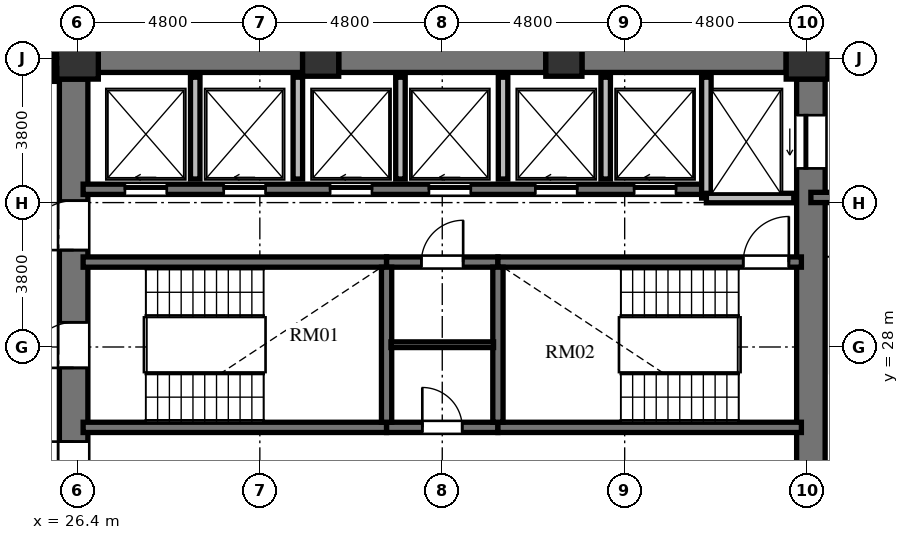
"""IFC4 building model, lengths in metres.
Left out: names, types, materials, properties, quantities, classifications, styles, units other than length and angle.
Written with IfcOpenShell. Run it as: python <this file> out.ifc"""

import sys

from ifc_helpers import new_model, si_unit, direction, frame, frame_2d, origin, origin_2d, place, context, subcontext, project, spatial, rectangle, extrude, element, fill, save


model = new_model("IFC4")
c1 = context("Model", 3, precision=1e-05, world=origin(), true_north=direction((0.0, 1.0)))
c2 = subcontext(c1, "Body", "Model", "MODEL_VIEW")
j1 = project(units=[si_unit("LENGTHUNIT", "METRE"), si_unit("PLANEANGLEUNIT", "RADIAN")], contexts=[c1])
p1 = place(None, origin())
s1 = spatial("IfcSite", under=j1, at=p1, CompositionType="ELEMENT")
p2 = place(p1, origin())
s2 = spatial("IfcBuilding", under=s1, at=p2, CompositionType="ELEMENT")
p3 = place(p2, frame((0.0, 0.0, 107.28)))
s3 = spatial("IfcBuildingStorey", under=s2, at=p3, CompositionType="ELEMENT", Elevation=107.28)
p4 = place(p3, frame((45.6, 35.6, 0.0), z_axis=(0.0, 0.0, 1.0), x_axis=(1.0, 0.0, 0.0)))
e1 = element("IfcColumn", 1, at=p4, inside=s3, PredefinedType="COLUMN", context=c2, shape_type="SweptSolid", body=[
    extrude(rectangle(XDim=1.1, YDim=1.1, at=origin_2d()), origin(), (0.0, 0.0, 1.0), 3.648),
])
for number, where, z_axis, x_axis in (
    (2, (39.2, 35.6, 0.0), (0.0, 0.0, 1.0), (1.0, 0.0, 0.0)),
    (3, (32.8, 35.6, 0.0), (0.0, 0.0, 1.0), (1.0, 0.0, 0.0)),
):
    element("IfcColumn", number, at=place(p3, frame(where, z_axis=z_axis, x_axis=x_axis)), inside=s3, PredefinedType="COLUMN", context=c2, shape_type="SweptSolid", body=[
        extrude(rectangle(XDim=0.95, YDim=0.95, at=origin_2d()), origin(), (0.0, 0.0, 1.0), 3.648),
    ])
p5 = place(p3, frame((26.4, 35.6, 0.0), z_axis=(0.0, 0.0, 1.0), x_axis=(1.0, 0.0, 0.0)))
e4 = element("IfcColumn", 4, at=p5, inside=s3, PredefinedType="COLUMN", context=c2, shape_type="SweptSolid", body=[
    extrude(rectangle(XDim=1.1, YDim=1.1, at=origin_2d()), origin(), (0.0, 0.0, 1.0), 3.648),
])
p6 = place(p3, frame((26.3, 20.95, 0.0), z_axis=(0.0, 0.0, 1.0), x_axis=(0.0, 1.0, 0.0)))
e5 = element("IfcWall", 5, at=p6, inside=s3, PredefinedType="SHEAR", context=c2, shape_type="SweptSolid", body=[
    extrude(rectangle(XDim=14.1, YDim=0.75, at=frame_2d((7.05, 0.0))), origin(), (0.0, 0.0, 1.0), 3.648),
])
p7 = place(p6, frame((6.5, 0.0, 0.0)))
e6 = element("IfcOpeningElement", 6, at=p7, cuts=e5, PredefinedType="OPENING", context=c2, shape_type="SweptSolid", body=[
    extrude(rectangle(XDim=1.2, YDim=2.15, at=frame_2d((0.6, 1.075))), frame((0.0, 0.385, 0.0), z_axis=(0.0, -1.0, 0.0), x_axis=(1.0, 0.0, 0.0)), (0.0, 0.0, 1.0), 0.77),
])
p8 = place(p6, frame((9.6, 0.0, 0.0)))
e7 = element("IfcOpeningElement", 7, at=p8, cuts=e5, PredefinedType="OPENING", context=c2, shape_type="SweptSolid", body=[
    extrude(rectangle(XDim=1.3, YDim=2.2, at=frame_2d((0.65, 1.1))), frame((0.0, 0.385, 0.0), z_axis=(0.0, -1.0, 0.0), x_axis=(1.0, 0.0, 0.0)), (0.0, 0.0, 1.0), 0.77),
])
p9 = place(p6, frame((3.26, 0.0, 0.0)))
e8 = element("IfcOpeningElement", 8, at=p9, cuts=e5, PredefinedType="OPENING", context=c2, shape_type="SweptSolid", body=[
    extrude(rectangle(XDim=1.3, YDim=2.2, at=frame_2d((0.65, 1.1))), frame((0.0, 0.385, 0.0), z_axis=(0.0, -1.0, 0.0), x_axis=(1.0, 0.0, 0.0)), (0.0, 0.0, 1.0), 0.77),
])
p10 = place(p3, frame((45.7, 20.95, 0.0), z_axis=(0.0, 0.0, 1.0), x_axis=(0.0, 1.0, 0.0)))
e9 = element("IfcWall", 9, at=p10, inside=s3, PredefinedType="SHEAR", context=c2, shape_type="SweptSolid", body=[
    extrude(rectangle(XDim=14.1, YDim=0.75, at=frame_2d((7.05, 0.0))), origin(), (0.0, 0.0, 1.0), 3.648),
])
p11 = place(p10, frame((11.75, 0.0, 0.0)))
e10 = element("IfcOpeningElement", 10, at=p11, cuts=e9, PredefinedType="OPENING", context=c2, shape_type="SweptSolid", body=[
    extrude(rectangle(XDim=1.4, YDim=2.3, at=frame_2d((0.7, 1.15))), frame((0.0, 0.385, 0.0), z_axis=(0.0, -1.0, 0.0), x_axis=(1.0, 0.0, 0.0)), (0.0, 0.0, 1.0), 0.77),
])
p12 = place(p10, frame((0.95, 0.0, 0.0)))
e11 = element("IfcOpeningElement", 11, at=p12, cuts=e9, PredefinedType="OPENING", context=c2, shape_type="SweptSolid", body=[
    extrude(rectangle(XDim=1.4, YDim=2.3, at=frame_2d((0.7, 1.15))), frame((0.0, 0.385, 0.0), z_axis=(0.0, -1.0, 0.0), x_axis=(1.0, 0.0, 0.0)), (0.0, 0.0, 1.0), 0.77),
])
p13 = place(p3, frame((26.95, 35.6, 0.0), z_axis=(0.0, 0.0, 1.0), x_axis=(1.0, 0.0, 0.0)))
e12 = element("IfcWall", 12, at=p13, inside=s3, PredefinedType="SHEAR", context=c2, shape_type="SweptSolid", body=[
    extrude(rectangle(XDim=5.375, YDim=0.75, at=frame_2d((2.688, 0.0))), origin(), (0.0, 0.0, 1.0), 3.648),
])
p14 = place(p3, frame((33.275, 35.6, 0.0), z_axis=(0.0, 0.0, 1.0), x_axis=(1.0, 0.0, 0.0)))
e13 = element("IfcWall", 13, at=p14, inside=s3, PredefinedType="SHEAR", context=c2, shape_type="SweptSolid", body=[
    extrude(rectangle(XDim=5.45, YDim=0.75, at=frame_2d((2.725, 0.0))), origin(), (0.0, 0.0, 1.0), 3.648),
])
p15 = place(p3, frame((39.675, 35.6, 0.0), z_axis=(0.0, 0.0, 1.0), x_axis=(1.0, 0.0, 0.0)))
e14 = element("IfcWall", 14, at=p15, inside=s3, PredefinedType="SHEAR", context=c2, shape_type="SweptSolid", body=[
    extrude(rectangle(XDim=5.375, YDim=0.75, at=frame_2d((2.688, 0.0))), origin(), (0.0, 0.0, 1.0), 3.648),
])
p16 = place(p3, frame((26.55, 30.235, 0.0), z_axis=(0.0, 0.0, 1.0), x_axis=(1.0, 0.0, 0.0)))
e15 = element("IfcWall", 15, at=p16, inside=s3, PredefinedType="SHEAR", context=c2, shape_type="SweptSolid", body=[
    extrude(rectangle(XDim=7.985, YDim=0.27, at=frame_2d((3.992, 0.0))), origin(), (0.0, 0.0, 1.0), 3.648),
])
p17 = place(p3, frame((34.535, 30.235, 0.0), z_axis=(0.0, 0.0, 1.0), x_axis=(1.0, 0.0, 0.0)))
e16 = element("IfcWall", 16, at=p17, inside=s3, PredefinedType="SHEAR", context=c2, shape_type="SweptSolid", body=[
    extrude(rectangle(XDim=2.93, YDim=0.27, at=frame_2d((1.465, 0.0))), origin(), (0.0, 0.0, 1.0), 3.648),
])
p18 = place(p17, frame((0.915, 0.0, 0.0)))
e17 = element("IfcOpeningElement", 17, at=p18, cuts=e16, PredefinedType="OPENING", context=c2, shape_type="SweptSolid", body=[
    extrude(rectangle(XDim=1.1, YDim=2.15, at=frame_2d((0.55, 1.075))), frame((0.0, 0.145, 0.0), z_axis=(0.0, -1.0, 0.0), x_axis=(1.0, 0.0, 0.0)), (0.0, 0.0, 1.0), 0.29),
])
p19 = place(p3, frame((37.465, 30.235, 0.0), z_axis=(0.0, 0.0, 1.0), x_axis=(1.0, 0.0, 0.0)))
e18 = element("IfcWall", 18, at=p19, inside=s3, PredefinedType="SHEAR", context=c2, shape_type="SweptSolid", body=[
    extrude(rectangle(XDim=7.985, YDim=0.27, at=frame_2d((3.992, 0.0))), origin(), (0.0, 0.0, 1.0), 3.648),
])
p20 = place(p19, frame((6.455, 0.0, 0.0)))
e19 = element("IfcOpeningElement", 19, at=p20, cuts=e18, PredefinedType="OPENING", context=c2, shape_type="SweptSolid", body=[
    extrude(rectangle(XDim=1.2, YDim=2.15, at=frame_2d((0.6, 1.075))), frame((0.0, 0.145, 0.0), z_axis=(0.0, -1.0, 0.0), x_axis=(1.0, 0.0, 0.0)), (0.0, 0.0, 1.0), 0.29),
])
p21 = place(p3, frame((26.55, 25.885, 0.0), z_axis=(0.0, 0.0, 1.0), x_axis=(1.0, 0.0, 0.0)))
e20 = element("IfcWall", 20, at=p21, inside=s3, PredefinedType="SHEAR", context=c2, shape_type="SweptSolid", body=[
    extrude(rectangle(XDim=7.985, YDim=0.27, at=frame_2d((3.992, 0.0))), origin(), (0.0, 0.0, 1.0), 3.648),
])
p22 = place(p3, frame((34.535, 25.885, 0.0), z_axis=(0.0, 0.0, 1.0), x_axis=(1.0, 0.0, 0.0)))
e21 = element("IfcWall", 21, at=p22, inside=s3, PredefinedType="SHEAR", context=c2, shape_type="SweptSolid", body=[
    extrude(rectangle(XDim=2.93, YDim=0.27, at=frame_2d((1.465, 0.0))), origin(), (0.0, 0.0, 1.0), 3.648),
])
p23 = place(p22, frame((0.94, 0.0, 0.0)))
e22 = element("IfcOpeningElement", 22, at=p23, cuts=e21, PredefinedType="OPENING", context=c2, shape_type="SweptSolid", body=[
    extrude(rectangle(XDim=1.05, YDim=2.15, at=frame_2d((0.525, 1.075))), frame((0.0, 0.145, 0.0), z_axis=(0.0, -1.0, 0.0), x_axis=(1.0, 0.0, 0.0)), (0.0, 0.0, 1.0), 0.29),
])
p24 = place(p3, frame((37.465, 25.885, 0.0), z_axis=(0.0, 0.0, 1.0), x_axis=(1.0, 0.0, 0.0)))
e23 = element("IfcWall", 23, at=p24, inside=s3, PredefinedType="SHEAR", context=c2, shape_type="SweptSolid", body=[
    extrude(rectangle(XDim=7.985, YDim=0.27, at=frame_2d((3.992, 0.0))), origin(), (0.0, 0.0, 1.0), 3.648),
])
for number, where, z_axis, x_axis in (
    (24, (34.535, 26.02, 0.0), (0.0, 0.0, 1.0), (0.0, 1.0, 0.0)),
    (25, (37.465, 26.02, 0.0), (0.0, 0.0, 1.0), (0.0, 1.0, 0.0)),
):
    element("IfcWall", number, at=place(p3, frame(where, z_axis=z_axis, x_axis=x_axis)), inside=s3, PredefinedType="SHEAR", context=c2, shape_type="SweptSolid", body=[
        extrude(rectangle(XDim=4.08, YDim=0.27, at=frame_2d((2.04, 0.0))), origin(), (0.0, 0.0, 1.0), 3.648),
    ])
p25 = place(p3, frame((34.65, 28.06, 0.0), z_axis=(0.0, 0.0, 1.0), x_axis=(1.0, 0.0, 0.0)))
e26 = element("IfcWall", 26, at=p25, inside=s3, PredefinedType="PARTITIONING", context=c2, shape_type="SweptSolid", body=[
    extrude(rectangle(XDim=2.7, YDim=0.15, at=frame_2d((1.35, 0.0))), origin(), (0.0, 0.0, 1.0), 3.428),
])
p26 = place(p3, frame((26.55, 32.15, 0.0), z_axis=(0.0, 0.0, 1.0), x_axis=(1.0, 0.0, 0.0)))
e27 = element("IfcWall", 27, at=p26, inside=s3, PredefinedType="SHEAR", context=c2, shape_type="SweptSolid", body=[
    extrude(rectangle(XDim=16.4, YDim=0.27, at=frame_2d((8.2, 0.0))), origin(), (0.0, 0.0, 1.0), 3.648),
])
p27 = place(p26, frame((1.1, 0.0, 0.0)))
e28 = element("IfcOpeningElement", 28, at=p27, cuts=e27, PredefinedType="OPENING", context=c2, shape_type="SweptSolid", body=[
    extrude(rectangle(XDim=1.1, YDim=2.2, at=frame_2d((0.55, 1.1))), frame((0.0, 0.145, 0.0), z_axis=(0.0, -1.0, 0.0), x_axis=(1.0, 0.0, 0.0)), (0.0, 0.0, 1.0), 0.29),
])
p28 = place(p26, frame((3.7, 0.0, 0.0)))
e29 = element("IfcOpeningElement", 29, at=p28, cuts=e27, PredefinedType="OPENING", context=c2, shape_type="SweptSolid", body=[
    extrude(rectangle(XDim=1.1, YDim=2.2, at=frame_2d((0.55, 1.1))), frame((0.0, 0.145, 0.0), z_axis=(0.0, -1.0, 0.0), x_axis=(1.0, 0.0, 0.0)), (0.0, 0.0, 1.0), 0.29),
])
p29 = place(p26, frame((6.5, 0.0, 0.0)))
e30 = element("IfcOpeningElement", 30, at=p29, cuts=e27, PredefinedType="OPENING", context=c2, shape_type="SweptSolid", body=[
    extrude(rectangle(XDim=1.1, YDim=2.2, at=frame_2d((0.55, 1.1))), frame((0.0, 0.145, 0.0), z_axis=(0.0, -1.0, 0.0), x_axis=(1.0, 0.0, 0.0)), (0.0, 0.0, 1.0), 0.29),
])
p30 = place(p26, frame((9.1, 0.0, 0.0)))
e31 = element("IfcOpeningElement", 31, at=p30, cuts=e27, PredefinedType="OPENING", context=c2, shape_type="SweptSolid", body=[
    extrude(rectangle(XDim=1.1, YDim=2.2, at=frame_2d((0.55, 1.1))), frame((0.0, 0.145, 0.0), z_axis=(0.0, -1.0, 0.0), x_axis=(1.0, 0.0, 0.0)), (0.0, 0.0, 1.0), 0.29),
])
p31 = place(p26, frame((11.9, 0.0, 0.0)))
e32 = element("IfcOpeningElement", 32, at=p31, cuts=e27, PredefinedType="OPENING", context=c2, shape_type="SweptSolid", body=[
    extrude(rectangle(XDim=1.1, YDim=2.2, at=frame_2d((0.55, 1.1))), frame((0.0, 0.145, 0.0), z_axis=(0.0, -1.0, 0.0), x_axis=(1.0, 0.0, 0.0)), (0.0, 0.0, 1.0), 0.29),
])
p32 = place(p26, frame((14.5, 0.0, 0.0)))
e33 = element("IfcOpeningElement", 33, at=p32, cuts=e27, PredefinedType="OPENING", context=c2, shape_type="SweptSolid", body=[
    extrude(rectangle(XDim=1.1, YDim=2.2, at=frame_2d((0.55, 1.1))), frame((0.0, 0.145, 0.0), z_axis=(0.0, -1.0, 0.0), x_axis=(1.0, 0.0, 0.0)), (0.0, 0.0, 1.0), 0.29),
])
p33 = place(p3, frame((42.95, 31.92, 0.0), z_axis=(0.0, 0.0, 1.0), x_axis=(0.0, 1.0, 0.0)))
e34 = element("IfcWall", 34, at=p33, inside=s3, PredefinedType="SOLIDWALL", context=c2, shape_type="SweptSolid", body=[
    extrude(rectangle(XDim=3.18, YDim=0.25, at=frame_2d((1.59, 0.0))), origin(), (0.0, 0.0, 1.0), 3.428),
])
p34 = place(p3, frame((42.95, 31.92, 0.0), z_axis=(0.0, 0.0, 1.0), x_axis=(1.0, 0.0, 0.0)))
e35 = element("IfcWall", 35, at=p34, inside=s3, PredefinedType="SOLIDWALL", context=c2, shape_type="SweptSolid", body=[
    extrude(rectangle(XDim=2.3, YDim=0.25, at=frame_2d((1.15, 0.0))), origin(), (0.0, 0.0, 1.0), 3.428),
])
for number, where, z_axis, x_axis in (
    (36, (29.5, 32.42, 0.0), (0.0, 0.0, 1.0), (0.0, 1.0, 0.0)),
    (37, (32.2, 32.42, 0.0), (0.0, 0.0, 1.0), (0.0, 1.0, 0.0)),
    (38, (34.9, 32.42, 0.0), (0.0, 0.0, 1.0), (0.0, 1.0, 0.0)),
    (39, (37.6, 32.42, 0.0), (0.0, 0.0, 1.0), (0.0, 1.0, 0.0)),
    (40, (40.3, 32.42, 0.0), (0.0, 0.0, 1.0), (0.0, 1.0, 0.0)),
):
    element("IfcWall", number, at=place(p3, frame(where, z_axis=z_axis, x_axis=x_axis)), inside=s3, PredefinedType="SOLIDWALL", context=c2, shape_type="SweptSolid", body=[
        extrude(rectangle(XDim=2.68, YDim=0.25, at=frame_2d((1.34, 0.0))), origin(), (0.0, 0.0, 1.0), 3.428),
    ])
p35 = place(p3, frame((45.7, 31.935, 0.0), z_axis=(0.0, 0.0, 1.0), x_axis=(1.0, 0.0, 0.0)))
e41 = element("IfcWall", 41, at=p35, inside=s3, PredefinedType="SHEAR", context=c2, shape_type="SweptSolid", body=[
    extrude(rectangle(XDim=4.715, YDim=0.27, at=frame_2d((2.357, 0.0))), origin(), (0.0, 0.0, 1.0), 3.648),
])
p36 = place(p3, frame((25.83, 36.21, 0.0), z_axis=(0.0, 0.0, 1.0), x_axis=(0.0, -1.0, 0.0)))
e42 = element("IfcWall", 42, at=p36, inside=s3, PredefinedType="PARTITIONING", context=c2, shape_type="SweptSolid", body=[
    extrude(rectangle(XDim=1.22, YDim=0.18, at=frame_2d((0.61, 0.0))), origin(), (0.0, 0.0, 1.0), 3.428),
])
p37 = place(p7, origin())
e43 = element("IfcDoor", 43, at=p37, inside=s3, OperationType="SINGLE_SWING_LEFT", PredefinedType="DOOR", context=c2, shape_type="SweptSolid", body=[
    extrude(rectangle(XDim=1.2, YDim=2.15, at=frame_2d((0.6, 1.075))), frame((0.0, 0.025, 0.0), z_axis=(0.0, -1.0, 0.0), x_axis=(1.0, 0.0, 0.0)), (0.0, 0.0, 1.0), 0.05),
])
fill(e6, e43)
p38 = place(p20, origin())
e44 = element("IfcDoor", 44, at=p38, inside=s3, OperationType="SINGLE_SWING_RIGHT", PredefinedType="DOOR", context=c2, shape_type="SweptSolid", body=[
    extrude(rectangle(XDim=1.2, YDim=2.15, at=frame_2d((0.6, 1.075))), frame((0.0, 0.025, 0.0), z_axis=(0.0, -1.0, 0.0), x_axis=(1.0, 0.0, 0.0)), (0.0, 0.0, 1.0), 0.05),
])
fill(e19, e44)
p39 = place(p23, origin())
e45 = element("IfcDoor", 45, at=p39, inside=s3, OperationType="SINGLE_SWING_LEFT", PredefinedType="DOOR", context=c2, shape_type="SweptSolid", body=[
    extrude(rectangle(XDim=1.05, YDim=2.15, at=frame_2d((0.525, 1.075))), frame((0.0, 0.025, 0.0), z_axis=(0.0, -1.0, 0.0), x_axis=(1.0, 0.0, 0.0)), (0.0, 0.0, 1.0), 0.05),
])
fill(e22, e45)
p40 = place(p18, origin())
e46 = element("IfcDoor", 46, at=p40, inside=s3, OperationType="SINGLE_SWING_RIGHT", PredefinedType="DOOR", context=c2, shape_type="SweptSolid", body=[
    extrude(rectangle(XDim=1.1, YDim=2.15, at=frame_2d((0.55, 1.075))), frame((0.0, 0.025, 0.0), z_axis=(0.0, -1.0, 0.0), x_axis=(1.0, 0.0, 0.0)), (0.0, 0.0, 1.0), 0.05),
])
fill(e17, e46)
p41 = place(p8, origin())
e47 = element("IfcDoor", 47, at=p41, inside=s3, OperationType="SINGLE_SWING_LEFT", PredefinedType="DOOR", context=c2, shape_type="SweptSolid", body=[
    extrude(rectangle(XDim=1.3, YDim=2.2, at=frame_2d((0.65, 1.1))), frame((0.0, 0.025, 0.0), z_axis=(0.0, -1.0, 0.0), x_axis=(1.0, 0.0, 0.0)), (0.0, 0.0, 1.0), 0.05),
])
fill(e7, e47)
p42 = place(p9, origin())
e48 = element("IfcDoor", 48, at=p42, inside=s3, OperationType="SINGLE_SWING_RIGHT", PredefinedType="DOOR", context=c2, shape_type="SweptSolid", body=[
    extrude(rectangle(XDim=1.3, YDim=2.2, at=frame_2d((0.65, 1.1))), frame((0.0, 0.025, 0.0), z_axis=(0.0, -1.0, 0.0), x_axis=(1.0, 0.0, 0.0)), (0.0, 0.0, 1.0), 0.05),
])
fill(e8, e48)
p43 = place(p27, origin())
e49 = element("IfcDoor", 49, at=p43, inside=s3, OperationType="SLIDING_TO_LEFT", PredefinedType="DOOR", context=c2, shape_type="SweptSolid", body=[
    extrude(rectangle(XDim=1.1, YDim=2.2, at=frame_2d((0.55, 1.1))), frame((0.0, 0.025, 0.0), z_axis=(0.0, -1.0, 0.0), x_axis=(1.0, 0.0, 0.0)), (0.0, 0.0, 1.0), 0.05),
])
fill(e28, e49)
p44 = place(p28, origin())
e50 = element("IfcDoor", 50, at=p44, inside=s3, OperationType="SLIDING_TO_LEFT", PredefinedType="DOOR", context=c2, shape_type="SweptSolid", body=[
    extrude(rectangle(XDim=1.1, YDim=2.2, at=frame_2d((0.55, 1.1))), frame((0.0, 0.025, 0.0), z_axis=(0.0, -1.0, 0.0), x_axis=(1.0, 0.0, 0.0)), (0.0, 0.0, 1.0), 0.05),
])
fill(e29, e50)
p45 = place(p29, origin())
e51 = element("IfcDoor", 51, at=p45, inside=s3, OperationType="SLIDING_TO_LEFT", PredefinedType="DOOR", context=c2, shape_type="SweptSolid", body=[
    extrude(rectangle(XDim=1.1, YDim=2.2, at=frame_2d((0.55, 1.1))), frame((0.0, 0.025, 0.0), z_axis=(0.0, -1.0, 0.0), x_axis=(1.0, 0.0, 0.0)), (0.0, 0.0, 1.0), 0.05),
])
fill(e30, e51)
p46 = place(p30, origin())
e52 = element("IfcDoor", 52, at=p46, inside=s3, OperationType="SLIDING_TO_LEFT", PredefinedType="DOOR", context=c2, shape_type="SweptSolid", body=[
    extrude(rectangle(XDim=1.1, YDim=2.2, at=frame_2d((0.55, 1.1))), frame((0.0, 0.025, 0.0), z_axis=(0.0, -1.0, 0.0), x_axis=(1.0, 0.0, 0.0)), (0.0, 0.0, 1.0), 0.05),
])
fill(e31, e52)
p47 = place(p31, origin())
e53 = element("IfcDoor", 53, at=p47, inside=s3, OperationType="SLIDING_TO_LEFT", PredefinedType="DOOR", context=c2, shape_type="SweptSolid", body=[
    extrude(rectangle(XDim=1.1, YDim=2.2, at=frame_2d((0.55, 1.1))), frame((0.0, 0.025, 0.0), z_axis=(0.0, -1.0, 0.0), x_axis=(1.0, 0.0, 0.0)), (0.0, 0.0, 1.0), 0.05),
])
fill(e32, e53)
p48 = place(p32, origin())
e54 = element("IfcDoor", 54, at=p48, inside=s3, OperationType="SLIDING_TO_LEFT", PredefinedType="DOOR", context=c2, shape_type="SweptSolid", body=[
    extrude(rectangle(XDim=1.1, YDim=2.2, at=frame_2d((0.55, 1.1))), frame((0.0, 0.025, 0.0), z_axis=(0.0, -1.0, 0.0), x_axis=(1.0, 0.0, 0.0)), (0.0, 0.0, 1.0), 0.05),
])
fill(e33, e54)
p49 = place(p11, origin())
e55 = element("IfcDoor", 55, at=p49, inside=s3, OperationType="SLIDING_TO_LEFT", PredefinedType="DOOR", context=c2, shape_type="SweptSolid", body=[
    extrude(rectangle(XDim=1.4, YDim=2.3, at=frame_2d((0.7, 1.15))), frame((0.0, 0.025, 0.0), z_axis=(0.0, -1.0, 0.0), x_axis=(1.0, 0.0, 0.0)), (0.0, 0.0, 1.0), 0.05),
])
fill(e10, e55)
save(model, sys.argv[1])
